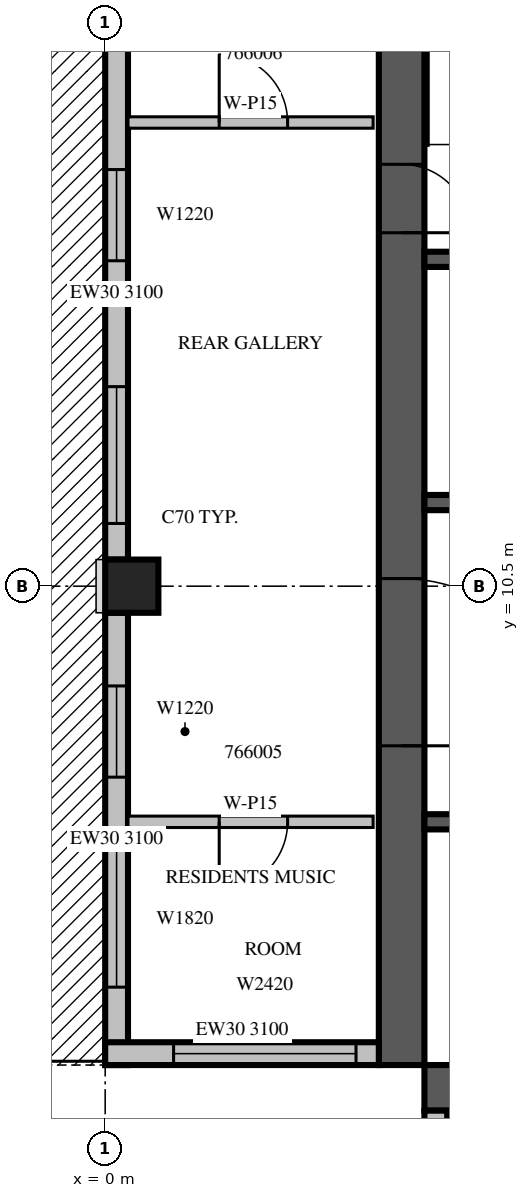
"""IFC4 building model, lengths in metres.
Left out: names, types, materials, properties, quantities, classifications, styles, units other than length and angle.
Written with IfcOpenShell. Run it as: python <this file> out.ifc"""

import sys

from ifc_helpers import new_model, si_unit, direction, frame, frame_2d, origin, origin_2d, place, context, subcontext, project, spatial, rectangle, extrude, source, transform, mapped, element, fill, save


model = new_model("IFC4")
c1 = context("Model", 3, precision=1e-05, world=origin(), true_north=direction((0.0, 1.0)))
c2 = subcontext(c1, "Body", "Model", "MODEL_VIEW")
j1 = project(units=[si_unit("LENGTHUNIT", "METRE"), si_unit("PLANEANGLEUNIT", "RADIAN")], contexts=[c1])
p1 = place(None, origin())
s1 = spatial("IfcSite", under=j1, at=p1, CompositionType="ELEMENT")
p2 = place(p1, origin())
s2 = spatial("IfcBuilding", under=s1, at=p2, CompositionType="ELEMENT")
p3 = place(p2, frame((0.0, 0.0, 291.5)))
s3 = spatial("IfcBuildingStorey", under=s2, at=p3, CompositionType="ELEMENT", Elevation=291.5)
m1 = source(origin(), c2, "Body", "SweptSolid", [
    extrude(rectangle(XDim=0.7, YDim=0.7, at=origin_2d()), origin(), (0.0, 0.0, 1.0), 3.5),
])
p4 = place(p3, frame((0.35, 10.5, 0.0), z_axis=(0.0, 0.0, 1.0), x_axis=(1.0, 0.0, 0.0)))
e1 = element("IfcColumn", 1, at=p4, inside=s3, PredefinedType="COLUMN", context=c2, shape_type="MappedRepresentation", body=[
    mapped(m1, transform((0.0, 0.0, 0.0), scale=1.0)),
])
m2 = source(origin(), c2, "Body", "SweptSolid", [
    extrude(rectangle(XDim=17.4, YDim=0.6, at=frame_2d((8.7, 0.0))), origin(), (0.0, 0.0, 1.0), 3.5),
])
p5 = place(p3, frame((3.9, 4.2, 0.0), z_axis=(0.0, 0.0, 1.0), x_axis=(0.0, 1.0, 0.0)))
e2 = element("IfcWall", 2, at=p5, inside=s3, PredefinedType="SHEAR", context=c2, shape_type="MappedRepresentation", body=[
    mapped(m2, transform((0.0, 0.0, 0.0), scale=1.0)),
])
m3 = source(origin(), c2, "Body", "SweptSolid", [
    extrude(rectangle(XDim=2.2, YDim=2.1, at=frame_2d((1.1, 1.05))), frame((0.0, 0.31, 0.0), z_axis=(0.0, -1.0, 0.0), x_axis=(1.0, 0.0, 0.0)), (0.0, 0.0, 1.0), 0.62),
])
p6 = place(p5, frame((4.2, 0.0, 0.0)))
e3 = element("IfcOpeningElement", 3, at=p6, cuts=e2, PredefinedType="OPENING", context=c2, shape_type="MappedRepresentation", body=[
    mapped(m3, transform((0.0, 0.0, 0.0), scale=1.0)),
])
m4 = source(origin(), c2, "Body", "SweptSolid", [
    extrude(rectangle(XDim=0.9, YDim=2.1, at=frame_2d((0.45, 1.05))), frame((0.0, 0.31, 0.0), z_axis=(0.0, -1.0, 0.0), x_axis=(1.0, 0.0, 0.0)), (0.0, 0.0, 1.0), 0.62),
])
p7 = place(p5, frame((10.95, 0.0, 0.0)))
e4 = element("IfcOpeningElement", 4, at=p7, cuts=e2, PredefinedType="OPENING", context=c2, shape_type="MappedRepresentation", body=[
    mapped(m4, transform((0.0, 0.0, 0.0), scale=1.0)),
])
p8 = place(p3, frame((4.2, 3.9, 0.0), z_axis=(0.0, 0.0, 1.0), x_axis=(1.0, 0.0, 0.0)))
e5 = element("IfcWall", 5, at=p8, inside=s3, PredefinedType="SHEAR", context=c2, shape_type="MappedRepresentation", body=[
    mapped(m2, transform((0.0, 0.0, 0.0), scale=1.0)),
])
p9 = place(p8, frame((15.2, 0.0, 0.0)))
e6 = element("IfcOpeningElement", 6, at=p9, cuts=e5, PredefinedType="OPENING", context=c2, shape_type="MappedRepresentation", body=[
    mapped(m4, transform((0.0, 0.0, 0.0), scale=1.0)),
])
p10 = place(p3, frame((0.15, 17.85, 0.0), z_axis=(0.0, 0.0, 1.0), x_axis=(0.0, -1.0, 0.0)))
e7 = element("IfcWall", 7, at=p10, inside=s3, PredefinedType="STANDARD", context=c2, shape_type="SweptSolid", body=[
    extrude(rectangle(XDim=7.0, YDim=0.3, at=frame_2d((3.5, 0.0))), origin(), (0.0, 0.0, 1.0), 3.1),
])
m5 = source(origin(), c2, "Body", "SweptSolid", [
    extrude(rectangle(XDim=1.8, YDim=2.4, at=frame_2d((0.9, 1.2))), frame((0.0, 0.16, 0.0), z_axis=(0.0, -1.0, 0.0), x_axis=(1.0, 0.0, 0.0)), (0.0, 0.0, 1.0), 0.32),
])
p11 = place(p10, frame((4.725, 0.0, 0.0)))
e8 = element("IfcOpeningElement", 8, at=p11, cuts=e7, PredefinedType="OPENING", context=c2, shape_type="MappedRepresentation", body=[
    mapped(m5, transform((0.0, 0.0, 0.0), scale=1.0)),
])
m6 = source(origin(), c2, "Body", "SweptSolid", [
    extrude(rectangle(XDim=1.2, YDim=2.0, at=frame_2d((0.6, 1.0))), frame((0.0, 0.16, 0.0), z_axis=(0.0, -1.0, 0.0), x_axis=(1.0, 0.0, 0.0)), (0.0, 0.0, 1.0), 0.32),
])
p12 = place(p10, frame((1.869, 0.0, 0.6)))
e9 = element("IfcOpeningElement", 9, at=p12, cuts=e7, PredefinedType="OPENING", context=c2, shape_type="MappedRepresentation", body=[
    mapped(m6, transform((0.0, 0.0, 0.0), scale=1.0)),
])
m7 = source(origin(), c2, "Body", "SweptSolid", [
    extrude(rectangle(XDim=5.95, YDim=0.3, at=frame_2d((2.975, 0.0))), origin(), (0.0, 0.0, 1.0), 3.1),
])
p13 = place(p3, frame((0.15, 10.15, 0.0), z_axis=(0.0, 0.0, 1.0), x_axis=(0.0, -1.0, 0.0)))
e10 = element("IfcWall", 10, at=p13, inside=s3, PredefinedType="STANDARD", context=c2, shape_type="MappedRepresentation", body=[
    mapped(m7, transform((0.0, 0.0, 0.0), scale=1.0)),
])
m8 = source(origin(), c2, "Body", "SweptSolid", [
    extrude(rectangle(XDim=1.8, YDim=2.0, at=frame_2d((0.9, 1.0))), frame((0.0, 0.16, 0.0), z_axis=(0.0, -1.0, 0.0), x_axis=(1.0, 0.0, 0.0)), (0.0, 0.0, 1.0), 0.32),
])
p14 = place(p13, frame((3.125, 0.0, 0.6)))
e11 = element("IfcOpeningElement", 11, at=p14, cuts=e10, PredefinedType="OPENING", context=c2, shape_type="MappedRepresentation", body=[
    mapped(m8, transform((0.0, 0.0, 0.0), scale=1.0)),
])
p15 = place(p13, frame((0.963, 0.0, 0.6)))
e12 = element("IfcOpeningElement", 12, at=p15, cuts=e10, PredefinedType="OPENING", context=c2, shape_type="MappedRepresentation", body=[
    mapped(m6, transform((0.0, 0.0, 0.0), scale=1.0)),
])
m9 = source(origin(), c2, "Body", "SweptSolid", [
    extrude(rectangle(XDim=3.6, YDim=0.3, at=frame_2d((1.8, 0.0))), origin(), (0.0, 0.0, 1.0), 3.1),
])
p16 = place(p3, frame((0.0, 4.35, 0.0), z_axis=(0.0, 0.0, 1.0), x_axis=(1.0, 0.0, 0.0)))
e13 = element("IfcWall", 13, at=p16, inside=s3, PredefinedType="STANDARD", context=c2, shape_type="MappedRepresentation", body=[
    mapped(m9, transform((0.0, 0.0, 0.0), scale=1.0)),
])
m10 = source(origin(), c2, "Body", "SweptSolid", [
    extrude(rectangle(XDim=2.4, YDim=2.0, at=frame_2d((1.2, 1.0))), frame((0.0, 0.16, 0.0), z_axis=(0.0, -1.0, 0.0), x_axis=(1.0, 0.0, 0.0)), (0.0, 0.0, 1.0), 0.32),
])
p17 = place(p16, frame((0.9, 0.0, 0.6)))
e14 = element("IfcOpeningElement", 14, at=p17, cuts=e13, PredefinedType="OPENING", context=c2, shape_type="MappedRepresentation", body=[
    mapped(m10, transform((0.0, 0.0, 0.0), scale=1.0)),
])
p18 = place(p3, frame((4.35, 3.6, 0.0), z_axis=(0.0, 0.0, 1.0), x_axis=(0.0, -1.0, 0.0)))
e15 = element("IfcWall", 15, at=p18, inside=s3, PredefinedType="STANDARD", context=c2, shape_type="MappedRepresentation", body=[
    mapped(m9, transform((0.0, 0.0, 0.0), scale=1.0)),
])
p19 = place(p18, frame((0.3, 0.0, 0.6)))
e16 = element("IfcOpeningElement", 16, at=p19, cuts=e15, PredefinedType="OPENING", context=c2, shape_type="MappedRepresentation", body=[
    mapped(m10, transform((0.0, 0.0, 0.0), scale=1.0)),
])
m11 = source(origin(), c2, "Body", "SweptSolid", [
    extrude(rectangle(XDim=9.6, YDim=0.2, at=frame_2d((4.8, 0.0))), origin(), (0.0, 0.0, 1.0), 3.5),
])
p20 = place(p3, frame((4.2, 7.4, 0.0), z_axis=(0.0, 0.0, 1.0), x_axis=(1.0, 0.0, 0.0)))
e17 = element("IfcWall", 17, at=p20, inside=s3, PredefinedType="SOLIDWALL", context=c2, shape_type="MappedRepresentation", body=[
    mapped(m11, transform((0.0, 0.0, 0.0), scale=1.0)),
])
m12 = source(origin(), c2, "Body", "SweptSolid", [
    extrude(rectangle(XDim=1.1, YDim=2.1, at=frame_2d((0.55, 1.05))), frame((0.0, 0.11, 0.0), z_axis=(0.0, -1.0, 0.0), x_axis=(1.0, 0.0, 0.0)), (0.0, 0.0, 1.0), 0.22),
])
p21 = place(p20, frame((0.65, 0.0, 0.0)))
e18 = element("IfcOpeningElement", 18, at=p21, cuts=e17, PredefinedType="OPENING", context=c2, shape_type="MappedRepresentation", body=[
    mapped(m12, transform((0.0, 0.0, 0.0), scale=1.0)),
])
p22 = place(p20, frame((3.05, 0.0, 0.0)))
e19 = element("IfcOpeningElement", 19, at=p22, cuts=e17, PredefinedType="OPENING", context=c2, shape_type="MappedRepresentation", body=[
    mapped(m12, transform((0.0, 0.0, 0.0), scale=1.0)),
])
p23 = place(p20, frame((5.45, 0.0, 0.0)))
e20 = element("IfcOpeningElement", 20, at=p23, cuts=e17, PredefinedType="OPENING", context=c2, shape_type="MappedRepresentation", body=[
    mapped(m12, transform((0.0, 0.0, 0.0), scale=1.0)),
])
p24 = place(p20, frame((7.85, 0.0, 0.0)))
e21 = element("IfcOpeningElement", 21, at=p24, cuts=e17, PredefinedType="OPENING", context=c2, shape_type="MappedRepresentation", body=[
    mapped(m12, transform((0.0, 0.0, 0.0), scale=1.0)),
])
m13 = source(origin(), c2, "Body", "SweptSolid", [
    extrude(rectangle(XDim=4.8, YDim=0.2, at=frame_2d((2.4, 0.0))), origin(), (0.0, 0.0, 1.0), 3.5),
])
p25 = place(p3, frame((4.2, 11.6, 0.0), z_axis=(0.0, 0.0, 1.0), x_axis=(1.0, 0.0, 0.0)))
e22 = element("IfcWall", 22, at=p25, inside=s3, PredefinedType="SOLIDWALL", context=c2, shape_type="MappedRepresentation", body=[
    mapped(m13, transform((0.0, 0.0, 0.0), scale=1.0)),
])
p26 = place(p25, frame((0.65, 0.0, 0.0)))
e23 = element("IfcOpeningElement", 23, at=p26, cuts=e22, PredefinedType="OPENING", context=c2, shape_type="MappedRepresentation", body=[
    mapped(m12, transform((0.0, 0.0, 0.0), scale=1.0)),
])
p27 = place(p25, frame((3.05, 0.0, 0.0)))
e24 = element("IfcOpeningElement", 24, at=p27, cuts=e22, PredefinedType="OPENING", context=c2, shape_type="MappedRepresentation", body=[
    mapped(m12, transform((0.0, 0.0, 0.0), scale=1.0)),
])
p28 = place(p3, frame((4.2, 14.8, 0.0), z_axis=(0.0, 0.0, 1.0), x_axis=(1.0, 0.0, 0.0)))
e25 = element("IfcWall", 25, at=p28, inside=s3, PredefinedType="SOLIDWALL", context=c2, shape_type="MappedRepresentation", body=[
    mapped(m13, transform((0.0, 0.0, 0.0), scale=1.0)),
])
m14 = source(origin(), c2, "Body", "SweptSolid", [
    extrude(rectangle(XDim=3.225, YDim=0.15, at=frame_2d((1.613, 0.0))), origin(), (0.0, 0.0, 1.0), 3.1),
])
p29 = place(p3, frame((0.3, 7.4, 0.0), z_axis=(0.0, 0.0, 1.0), x_axis=(1.0, 0.0, 0.0)))
e26 = element("IfcWall", 26, at=p29, inside=s3, PredefinedType="PARTITIONING", context=c2, shape_type="MappedRepresentation", body=[
    mapped(m14, transform((0.0, 0.0, 0.0), scale=1.0)),
])
m15 = source(origin(), c2, "Body", "SweptSolid", [
    extrude(rectangle(XDim=0.9, YDim=2.1, at=frame_2d((0.45, 1.05))), frame((0.0, 0.085, 0.0), z_axis=(0.0, -1.0, 0.0), x_axis=(1.0, 0.0, 0.0)), (0.0, 0.0, 1.0), 0.17),
])
p30 = place(p29, frame((1.2, 0.0, 0.0)))
e27 = element("IfcOpeningElement", 27, at=p30, cuts=e26, PredefinedType="OPENING", context=c2, shape_type="MappedRepresentation", body=[
    mapped(m15, transform((0.0, 0.0, 0.0), scale=1.0)),
])
p31 = place(p3, frame((0.3, 16.6, 0.0), z_axis=(0.0, 0.0, 1.0), x_axis=(1.0, 0.0, 0.0)))
e28 = element("IfcWall", 28, at=p31, inside=s3, PredefinedType="PARTITIONING", context=c2, shape_type="MappedRepresentation", body=[
    mapped(m14, transform((0.0, 0.0, 0.0), scale=1.0)),
])
p32 = place(p31, frame((1.2, 0.0, 0.0)))
e29 = element("IfcOpeningElement", 29, at=p32, cuts=e28, PredefinedType="OPENING", context=c2, shape_type="MappedRepresentation", body=[
    mapped(m15, transform((0.0, 0.0, 0.0), scale=1.0)),
])
m16 = source(origin(), c2, "Body", "SweptSolid", [
    extrude(rectangle(XDim=1.8, YDim=2.4, at=frame_2d((0.9, 1.2))), frame((0.0, 0.025, 0.0), z_axis=(0.0, -1.0, 0.0), x_axis=(1.0, 0.0, 0.0)), (0.0, 0.0, 1.0), 0.05),
])
p33 = place(p11, origin())
e30 = element("IfcDoor", 30, at=p33, inside=s3, OperationType="SLIDING_TO_LEFT", PredefinedType="DOOR", context=c2, shape_type="MappedRepresentation", body=[
    mapped(m16, transform((0.0, 0.0, 0.0), scale=1.0)),
])
fill(e8, e30)
m17 = source(origin(), c2, "Body", "SweptSolid", [
    extrude(rectangle(XDim=1.8, YDim=2.0, at=frame_2d((0.9, 1.0))), frame((0.0, 0.03, 0.0), z_axis=(0.0, -1.0, 0.0), x_axis=(1.0, 0.0, 0.0)), (0.0, 0.0, 1.0), 0.06),
])
p34 = place(p14, origin())
e31 = element("IfcWindow", 31, at=p34, inside=s3, PartitioningType="SINGLE_PANEL", PredefinedType="WINDOW", context=c2, shape_type="MappedRepresentation", body=[
    mapped(m17, transform((0.0, 0.0, 0.0), scale=1.0)),
])
fill(e11, e31)
m18 = source(origin(), c2, "Body", "SweptSolid", [
    extrude(rectangle(XDim=1.2, YDim=2.0, at=frame_2d((0.6, 1.0))), frame((0.0, 0.03, 0.0), z_axis=(0.0, -1.0, 0.0), x_axis=(1.0, 0.0, 0.0)), (0.0, 0.0, 1.0), 0.06),
])
p35 = place(p12, origin())
e32 = element("IfcWindow", 32, at=p35, inside=s3, PartitioningType="SINGLE_PANEL", PredefinedType="WINDOW", context=c2, shape_type="MappedRepresentation", body=[
    mapped(m18, transform((0.0, 0.0, 0.0), scale=1.0)),
])
fill(e9, e32)
p36 = place(p15, origin())
e33 = element("IfcWindow", 33, at=p36, inside=s3, PartitioningType="SINGLE_PANEL", PredefinedType="WINDOW", context=c2, shape_type="MappedRepresentation", body=[
    mapped(m18, transform((0.0, 0.0, 0.0), scale=1.0)),
])
fill(e12, e33)
m19 = source(origin(), c2, "Body", "SweptSolid", [
    extrude(rectangle(XDim=2.4, YDim=2.0, at=frame_2d((1.2, 1.0))), frame((0.0, 0.03, 0.0), z_axis=(0.0, -1.0, 0.0), x_axis=(1.0, 0.0, 0.0)), (0.0, 0.0, 1.0), 0.06),
])
p37 = place(p17, origin())
e34 = element("IfcWindow", 34, at=p37, inside=s3, PartitioningType="SINGLE_PANEL", PredefinedType="WINDOW", context=c2, shape_type="MappedRepresentation", body=[
    mapped(m19, transform((0.0, 0.0, 0.0), scale=1.0)),
])
fill(e14, e34)
m20 = source(origin(), c2, "Body", "SweptSolid", [
    extrude(rectangle(XDim=2.2, YDim=2.1, at=frame_2d((1.1, 1.05))), frame((0.0, 0.025, 0.0), z_axis=(0.0, -1.0, 0.0), x_axis=(1.0, 0.0, 0.0)), (0.0, 0.0, 1.0), 0.05),
])
p38 = place(p6, origin())
e35 = element("IfcDoor", 35, at=p38, inside=s3, OperationType="DOUBLE_DOOR_SINGLE_SWING", PredefinedType="DOOR", context=c2, shape_type="MappedRepresentation", body=[
    mapped(m20, transform((0.0, 0.0, 0.0), scale=1.0)),
])
fill(e3, e35)
m21 = source(origin(), c2, "Body", "SweptSolid", [
    extrude(rectangle(XDim=0.9, YDim=2.1, at=frame_2d((0.45, 1.05))), frame((0.0, 0.025, 0.0), z_axis=(0.0, -1.0, 0.0), x_axis=(1.0, 0.0, 0.0)), (0.0, 0.0, 1.0), 0.05),
])
p39 = place(p7, origin())
e36 = element("IfcDoor", 36, at=p39, inside=s3, OperationType="SINGLE_SWING_RIGHT", PredefinedType="DOOR", context=c2, shape_type="MappedRepresentation", body=[
    mapped(m21, transform((0.0, 0.0, 0.0), scale=1.0)),
])
fill(e4, e36)
p40 = place(p30, origin())
e37 = element("IfcDoor", 37, at=p40, inside=s3, OperationType="SINGLE_SWING_RIGHT", PredefinedType="DOOR", context=c2, shape_type="MappedRepresentation", body=[
    mapped(m21, transform((0.0, 0.0, 0.0), scale=1.0)),
])
fill(e27, e37)
p41 = place(p32, origin())
e38 = element("IfcDoor", 38, at=p41, inside=s3, OperationType="SINGLE_SWING_LEFT", PredefinedType="DOOR", context=c2, shape_type="MappedRepresentation", body=[
    mapped(m21, transform((0.0, 0.0, 0.0), scale=1.0)),
])
fill(e29, e38)
save(model, sys.argv[1])
